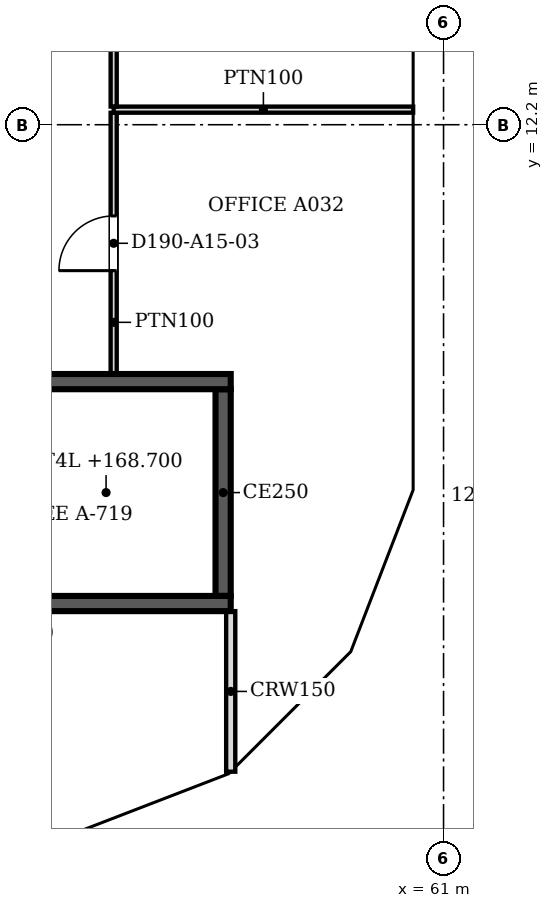
"""IFC4 building model, lengths in metres.
Left out: names, types, materials, properties, quantities, classifications, styles, units other than length and angle.
Written with IfcOpenShell. Run it as: python <this file> out.ifc"""

import sys

from ifc_helpers import new_model, si_unit, direction, frame, frame_2d, origin, place, context, subcontext, project, spatial, polyline, rectangle, outline, extrude, faceted_brep, source, transform, mapped, element, fill, save


model = new_model("IFC4")
c1 = context("Model", 3, precision=1e-05, world=origin(), true_north=direction((0.0, 1.0)))
c2 = subcontext(c1, "Body", "Model", "MODEL_VIEW")
j1 = project(units=[si_unit("LENGTHUNIT", "METRE"), si_unit("PLANEANGLEUNIT", "RADIAN")], contexts=[c1])
p1 = place(None, origin())
s1 = spatial("IfcSite", under=j1, at=p1, CompositionType="ELEMENT")
p2 = place(p1, origin())
s2 = spatial("IfcBuilding", under=s1, at=p2, CompositionType="ELEMENT")
p3 = place(p2, frame((0.0, 0.0, 166.8)))
s3 = spatial("IfcBuildingStorey", under=s2, at=p3, CompositionType="ELEMENT", Elevation=166.8)
m1 = source(origin(), c2, "Body", "Brep", [
    faceted_brep([(2.95, -0.25, 0.0), (3.003, -0.25, 0.068), (3.003, -0.25, 7.532), (2.95, -0.25, 7.6), (0.0, -0.25, 3.8), (0.047, 0.25, 3.86), (2.898, 0.25, 7.532), (2.898, 0.25, 0.068), (0.047, 0.25, 3.74), (2.95, 0.0, 0.0), (2.95, 0.0, 7.6), (0.0, 0.0, 3.8)], [[[0, 1, 2, 3, 4]], [[5, 6, 7, 8]], [[1, 0, 9]], [[10, 3, 2]], [[6, 5, 11, 4, 3, 10]], [[8, 7, 9, 0, 4, 11]], [[8, 11, 5]], [[1, 9, 7, 6, 10, 2]]]),
])
p4 = place(p3, frame((54.854, 0.25, -3.8), z_axis=(0.0, 0.0, 1.0), x_axis=(0.932970071518, 0.359953949349, 0.0)))
e1 = element("IfcWall", 1, at=p4, inside=s3, PredefinedType="SOLIDWALL", context=c2, shape_type="MappedRepresentation", body=[
    mapped(m1, transform((0.0, 0.0, 0.0), scale=1.0)),
])
m2 = source(origin(), c2, "Body", "SweptSolid", [
    extrude(outline(polyline([(2.75, 6.935), (0.316, 3.8), (2.75, 0.665), (2.75, 6.935)])), frame((0.0, 0.26, 0.0), z_axis=(0.0, -1.0, 0.0), x_axis=(1.0, 0.0, 0.0)), (0.0, 0.0, 1.0), 0.52),
])
p5 = place(p4, origin())
e2 = element("IfcOpeningElement", 2, at=p5, cuts=e1, PredefinedType="OPENING", context=c2, shape_type="MappedRepresentation", body=[
    mapped(m2, transform((0.0, 0.0, 0.0), scale=1.0)),
])
m3 = source(origin(), c2, "Body", "Brep", [
    faceted_brep([(0.053, -0.25, 0.0), (2.997, -0.25, 3.8), (0.053, -0.25, 7.6), (0.0, -0.25, 7.532), (0.0, -0.25, 0.068), (0.106, 0.25, 7.532), (2.944, 0.25, 3.868), (2.944, 0.25, 3.732), (0.106, 0.25, 0.068), (2.997, 0.0, 3.8), (0.053, 0.0, 0.0), (0.053, 0.0, 7.6)], [[[0, 1, 2, 3, 4]], [[5, 6, 7, 8]], [[8, 7, 9, 1, 0, 10]], [[6, 5, 11, 2, 1, 9]], [[3, 2, 11]], [[10, 0, 4]], [[8, 10, 4, 3, 11, 5]], [[9, 7, 6]]]),
])
p6 = place(p3, frame((57.569, 1.274, -3.8), z_axis=(0.0, 0.0, 1.0), x_axis=(0.707066050402, 0.707147509625, 0.0)))
e3 = element("IfcWall", 3, at=p6, inside=s3, PredefinedType="SOLIDWALL", context=c2, shape_type="MappedRepresentation", body=[
    mapped(m3, transform((0.0, 0.0, 0.0), scale=1.0)),
])
m4 = source(origin(), c2, "Body", "SweptSolid", [
    extrude(outline(polyline([(0.253, 0.666), (2.681, 3.8), (0.253, 6.934), (0.253, 0.666)])), frame((0.0, 0.26, 0.0), z_axis=(0.0, -1.0, 0.0), x_axis=(1.0, 0.0, 0.0)), (0.0, 0.0, 1.0), 0.52),
])
p7 = place(p6, origin())
e4 = element("IfcOpeningElement", 4, at=p7, cuts=e3, PredefinedType="OPENING", context=c2, shape_type="MappedRepresentation", body=[
    mapped(m4, transform((0.0, 0.0, 0.0), scale=1.0)),
])
m5 = source(origin(), c2, "Body", "Brep", [
    faceted_brep([(2.95, -0.25, 0.0), (2.997, -0.25, 0.059), (2.997, -0.25, 7.541), (2.95, -0.25, 7.6), (0.0, -0.25, 3.8), (0.053, 0.25, 3.868), (2.904, 0.25, 7.54), (2.904, 0.25, 0.06), (0.053, 0.25, 3.732), (2.95, 0.0, 0.0), (2.95, 0.0, 7.6), (0.0, 0.0, 3.8)], [[[0, 1, 2, 3, 4]], [[5, 6, 7, 8]], [[1, 0, 9]], [[10, 3, 2]], [[6, 5, 11, 4, 3, 10]], [[8, 7, 9, 0, 4, 11]], [[8, 11, 5]], [[1, 9, 7, 6, 10, 2]]]),
])
p8 = place(p3, frame((59.688, 3.394, -3.8), z_axis=(0.0, 0.0, 1.0), x_axis=(0.359972353723, 0.932962970624, 0.0)))
e5 = element("IfcWall", 5, at=p8, inside=s3, PredefinedType="SOLIDWALL", context=c2, shape_type="MappedRepresentation", body=[
    mapped(m5, transform((0.0, 0.0, 0.0), scale=1.0)),
])
p9 = place(p8, origin())
e6 = element("IfcOpeningElement", 6, at=p9, cuts=e5, PredefinedType="OPENING", context=c2, shape_type="MappedRepresentation", body=[
    mapped(m2, transform((0.0, 0.0, 0.0), scale=1.0)),
])
m6 = source(origin(), c2, "Body", "Brep", [
    faceted_brep([(0.047, -0.25, 0.0), (3.05, -0.25, 3.8), (0.047, -0.25, 7.6), (0.0, -0.25, 7.54), (0.0, -0.25, 0.06), (0.093, 0.25, 7.541), (3.05, 0.25, 3.8), (0.093, 0.25, 0.059), (0.047, 0.0, 0.0), (0.047, 0.0, 7.6)], [[[0, 1, 2, 3, 4]], [[5, 6, 7]], [[7, 6, 1, 0, 8]], [[6, 5, 9, 2, 1]], [[3, 2, 9]], [[8, 0, 4]], [[7, 8, 4, 3, 9, 5]]]),
])
p10 = place(p3, frame((60.75, 6.1, -3.8), z_axis=(0.0, 0.0, 1.0), x_axis=(0.0, 1.0, 0.0)))
e7 = element("IfcWall", 7, at=p10, inside=s3, PredefinedType="SOLIDWALL", context=c2, shape_type="MappedRepresentation", body=[
    mapped(m6, transform((0.0, 0.0, 0.0), scale=1.0)),
])
m7 = source(origin(), c2, "Body", "SweptSolid", [
    extrude(outline(polyline([(0.247, 0.656), (2.731, 3.8), (0.247, 6.944), (0.247, 0.656)])), frame((0.0, 0.26, 0.0), z_axis=(0.0, -1.0, 0.0), x_axis=(1.0, 0.0, 0.0)), (0.0, 0.0, 1.0), 0.52),
])
p11 = place(p10, origin())
e8 = element("IfcOpeningElement", 8, at=p11, cuts=e7, PredefinedType="OPENING", context=c2, shape_type="MappedRepresentation", body=[
    mapped(m7, transform((0.0, 0.0, 0.0), scale=1.0)),
])
m8 = source(origin(), c2, "Body", "SweptSolid", [
    extrude(outline(polyline([(3.05, 0.0), (6.1, 3.8), (3.05, 7.6), (0.0, 3.8), (3.05, 0.0)])), frame((0.0, 0.25, 0.0), z_axis=(0.0, -1.0, 0.0), x_axis=(1.0, 0.0, 0.0)), (0.0, 0.0, 1.0), 0.5),
])
p12 = place(p3, frame((60.75, 9.15, -3.8), z_axis=(0.0, 0.0, 1.0), x_axis=(0.0, 1.0, 0.0)))
e9 = element("IfcWall", 9, at=p12, inside=s3, PredefinedType="SOLIDWALL", context=c2, shape_type="MappedRepresentation", body=[
    mapped(m8, transform((0.0, 0.0, 0.0), scale=1.0)),
])
m9 = source(origin(), c2, "Body", "SweptSolid", [
    extrude(outline(polyline([(3.05, 0.399), (5.78, 3.8), (3.05, 7.201), (0.321, 3.8), (3.05, 0.399)])), frame((0.0, 0.26, 0.0), z_axis=(0.0, -1.0, 0.0), x_axis=(1.0, 0.0, 0.0)), (0.0, 0.0, 1.0), 0.52),
])
p13 = place(p12, origin())
e10 = element("IfcOpeningElement", 10, at=p13, cuts=e9, PredefinedType="OPENING", context=c2, shape_type="MappedRepresentation", body=[
    mapped(m9, transform((0.0, 0.0, 0.0), scale=1.0)),
])
p14 = place(p2, frame((0.0, 0.0, 170.6)))
s4 = spatial("IfcBuildingStorey", under=s2, at=p14, CompositionType="ELEMENT", Elevation=170.6)
m10 = source(origin(), c2, "Body", "Brep", [
    faceted_brep([(0.047, -0.25, 0.0), (2.997, -0.25, 3.8), (0.047, -0.25, 7.6), (0.0, -0.25, 7.541), (0.0, -0.25, 0.059), (0.093, 0.25, 7.54), (2.944, 0.25, 3.868), (2.944, 0.25, 3.732), (0.093, 0.25, 0.06), (2.997, 0.0, 3.8), (0.047, 0.0, 0.0), (0.047, 0.0, 7.6)], [[[0, 1, 2, 3, 4]], [[5, 6, 7, 8]], [[8, 7, 9, 1, 0, 10]], [[6, 5, 11, 2, 1, 9]], [[3, 2, 11]], [[10, 0, 4]], [[8, 10, 4, 3, 11, 5]], [[7, 6, 9]]]),
])
p15 = place(p14, frame((54.81, 0.233, -3.8), z_axis=(0.0, 0.0, 1.0), x_axis=(0.932990326376, 0.359901446078, 0.0)))
e11 = element("IfcWall", 11, at=p15, inside=s4, PredefinedType="SOLIDWALL", context=c2, shape_type="MappedRepresentation", body=[
    mapped(m10, transform((0.0, 0.0, 0.0), scale=1.0)),
])
m11 = source(origin(), c2, "Body", "SweptSolid", [
    extrude(outline(polyline([(0.247, 0.665), (2.681, 3.8), (0.247, 6.935), (0.247, 0.665)])), frame((0.0, 0.26, 0.0), z_axis=(0.0, -1.0, 0.0), x_axis=(1.0, 0.0, 0.0)), (0.0, 0.0, 1.0), 0.52),
])
p16 = place(p15, origin())
e12 = element("IfcOpeningElement", 12, at=p16, cuts=e11, PredefinedType="OPENING", context=c2, shape_type="MappedRepresentation", body=[
    mapped(m11, transform((0.0, 0.0, 0.0), scale=1.0)),
])
m12 = source(origin(), c2, "Body", "Brep", [
    faceted_brep([(2.944, -0.25, 0.0), (2.997, -0.25, 0.068), (2.997, -0.25, 7.532), (2.944, -0.25, 7.6), (0.0, -0.25, 3.8), (0.053, 0.25, 3.868), (2.891, 0.25, 7.532), (2.891, 0.25, 0.068), (0.053, 0.25, 3.732), (2.944, 0.0, 0.0), (2.944, 0.0, 7.6), (0.0, 0.0, 3.8)], [[[0, 1, 2, 3, 4]], [[5, 6, 7, 8]], [[1, 0, 9]], [[10, 3, 2]], [[6, 5, 11, 4, 3, 10]], [[8, 7, 9, 0, 4, 11]], [[8, 11, 5]], [[1, 9, 7, 6, 10, 2]]]),
])
p17 = place(p14, frame((57.606, 1.312, -3.8), z_axis=(0.0, 0.0, 1.0), x_axis=(0.707147509625, 0.707066050402, 0.0)))
e13 = element("IfcWall", 13, at=p17, inside=s4, PredefinedType="SOLIDWALL", context=c2, shape_type="MappedRepresentation", body=[
    mapped(m12, transform((0.0, 0.0, 0.0), scale=1.0)),
])
m13 = source(origin(), c2, "Body", "SweptSolid", [
    extrude(outline(polyline([(2.744, 6.934), (0.316, 3.8), (2.744, 0.666), (2.744, 6.934)])), frame((0.0, 0.26, 0.0), z_axis=(0.0, -1.0, 0.0), x_axis=(1.0, 0.0, 0.0)), (0.0, 0.0, 1.0), 0.52),
])
p18 = place(p17, origin())
e14 = element("IfcOpeningElement", 14, at=p18, cuts=e13, PredefinedType="OPENING", context=c2, shape_type="MappedRepresentation", body=[
    mapped(m13, transform((0.0, 0.0, 0.0), scale=1.0)),
])
m14 = source(origin(), c2, "Body", "Brep", [
    faceted_brep([(0.053, -0.25, 0.0), (3.003, -0.25, 3.8), (0.053, -0.25, 7.6), (0.0, -0.25, 7.531), (0.0, -0.25, 0.068), (0.106, 0.25, 7.532), (2.957, 0.25, 3.86), (2.957, 0.25, 3.74), (0.106, 0.25, 0.068), (3.003, 0.0, 3.8), (0.053, 0.0, 0.0), (0.053, 0.0, 7.6)], [[[0, 1, 2, 3, 4]], [[5, 6, 7, 8]], [[8, 7, 9, 1, 0, 10]], [[6, 5, 11, 2, 1, 9]], [[3, 2, 11]], [[10, 0, 4]], [[8, 10, 4, 3, 11, 5]], [[7, 6, 9]]]),
])
p19 = place(p14, frame((59.669, 3.344, -3.8), z_axis=(0.0, 0.0, 1.0), x_axis=(0.35992665181, 0.932980602862, 0.0)))
e15 = element("IfcWall", 15, at=p19, inside=s4, PredefinedType="SOLIDWALL", context=c2, shape_type="MappedRepresentation", body=[
    mapped(m14, transform((0.0, 0.0, 0.0), scale=1.0)),
])
m15 = source(origin(), c2, "Body", "SweptSolid", [
    extrude(outline(polyline([(0.253, 0.665), (2.687, 3.8), (0.253, 6.935), (0.253, 0.665)])), frame((0.0, 0.26, 0.0), z_axis=(0.0, -1.0, 0.0), x_axis=(1.0, 0.0, 0.0)), (0.0, 0.0, 1.0), 0.52),
])
p20 = place(p19, origin())
e16 = element("IfcOpeningElement", 16, at=p20, cuts=e15, PredefinedType="OPENING", context=c2, shape_type="MappedRepresentation", body=[
    mapped(m15, transform((0.0, 0.0, 0.0), scale=1.0)),
])
m16 = source(origin(), c2, "Body", "Brep", [
    faceted_brep([(3.003, -0.25, 0.0), (6.053, -0.25, 3.8), (3.003, -0.25, 7.6), (0.0, -0.25, 3.8), (0.047, 0.25, 3.859), (3.003, 0.25, 7.6), (6.053, 0.25, 3.8), (3.003, 0.25, 0.0), (0.047, 0.25, 3.741), (0.0, 0.0, 3.8)], [[[0, 1, 2, 3]], [[4, 5, 6, 7, 8]], [[7, 6, 1, 0]], [[6, 5, 2, 1]], [[5, 4, 9, 3, 2]], [[8, 7, 0, 3, 9]], [[8, 9, 4]]]),
])
p21 = place(p14, frame((60.75, 6.146, -3.8), z_axis=(0.0, 0.0, 1.0), x_axis=(0.0, 1.0, 0.0)))
e17 = element("IfcWall", 17, at=p21, inside=s4, PredefinedType="SOLIDWALL", context=c2, shape_type="MappedRepresentation", body=[
    mapped(m16, transform((0.0, 0.0, 0.0), scale=1.0)),
])
m17 = source(origin(), c2, "Body", "SweptSolid", [
    extrude(outline(polyline([(3.005, 0.401), (5.733, 3.8), (3.005, 7.199), (0.319, 3.8), (3.005, 0.401)])), frame((0.0, 0.26, 0.0), z_axis=(0.0, -1.0, 0.0), x_axis=(1.0, 0.0, 0.0)), (0.0, 0.0, 1.0), 0.52),
])
p22 = place(p21, origin())
e18 = element("IfcOpeningElement", 18, at=p22, cuts=e17, PredefinedType="OPENING", context=c2, shape_type="MappedRepresentation", body=[
    mapped(m17, transform((0.0, 0.0, 0.0), scale=1.0)),
])
m18 = source(origin(), c2, "Body", "SweptSolid", [
    extrude(outline(polyline([(3.05, 0.0), (6.1, 3.8), (3.05, 7.6), (0.0, 3.8), (3.05, 0.0)])), frame((0.0, 0.25, 0.0), z_axis=(0.0, -1.0, 0.0), x_axis=(1.0, 0.0, 0.0)), (0.0, 0.0, 1.0), 0.5),
])
p23 = place(p14, frame((60.75, 12.2, -3.8), z_axis=(0.0, 0.0, 1.0), x_axis=(0.0, 1.0, 0.0)))
e19 = element("IfcWall", 19, at=p23, inside=s4, PredefinedType="SOLIDWALL", context=c2, shape_type="MappedRepresentation", body=[
    mapped(m18, transform((0.0, 0.0, 0.0), scale=1.0)),
])
m19 = source(origin(), c2, "Body", "SweptSolid", [
    extrude(outline(polyline([(3.05, 0.399), (5.78, 3.8), (3.05, 7.2), (0.321, 3.8), (3.05, 0.399)])), frame((0.0, 0.26, 0.0), z_axis=(0.0, -1.0, 0.0), x_axis=(1.0, 0.0, 0.0)), (0.0, 0.0, 1.0), 0.52),
])
p24 = place(p23, origin())
e20 = element("IfcOpeningElement", 20, at=p24, cuts=e19, PredefinedType="OPENING", context=c2, shape_type="MappedRepresentation", body=[
    mapped(m19, transform((0.0, 0.0, 0.0), scale=1.0)),
])
p25 = place(p3, frame((57.5, 4.325, 0.0), z_axis=(0.0, 0.0, 1.0), x_axis=(-1.0, 0.0, 0.0)))
e21 = element("IfcWall", 21, at=p25, inside=s3, PredefinedType="SOLIDWALL", context=c2, shape_type="SweptSolid", body=[
    extrude(rectangle(XDim=8.5, YDim=0.25, at=frame_2d((4.25, 0.0))), origin(), (0.0, 0.0, 1.0), 3.8),
])
m20 = source(origin(), c2, "Body", "SweptSolid", [
    extrude(rectangle(XDim=1.2, YDim=2.1, at=frame_2d((0.6, 1.05))), frame((0.0, 0.135, 0.0), z_axis=(0.0, -1.0, 0.0), x_axis=(1.0, 0.0, 0.0)), (0.0, 0.0, 1.0), 0.27),
])
p26 = place(p25, frame((6.9, 0.0, 0.0)))
e22 = element("IfcOpeningElement", 22, at=p26, cuts=e21, PredefinedType="OPENING", context=c2, shape_type="MappedRepresentation", body=[
    mapped(m20, transform((0.0, 0.0, 0.0), scale=1.0)),
])
p27 = place(p3, frame((49.0, 7.975, 0.0), z_axis=(0.0, 0.0, 1.0), x_axis=(1.0, 0.0, 0.0)))
e23 = element("IfcWall", 23, at=p27, inside=s3, PredefinedType="SOLIDWALL", context=c2, shape_type="SweptSolid", body=[
    extrude(rectangle(XDim=8.5, YDim=0.25, at=frame_2d((4.25, 0.0))), origin(), (0.0, 0.0, 1.0), 3.8),
])
p28 = place(p3, frame((57.375, 7.85, 0.0), z_axis=(0.0, 0.0, 1.0), x_axis=(0.0, -1.0, 0.0)))
e24 = element("IfcWall", 24, at=p28, inside=s3, PredefinedType="SOLIDWALL", context=c2, shape_type="SweptSolid", body=[
    extrude(rectangle(XDim=3.4, YDim=0.25, at=frame_2d((1.7, 0.0))), origin(), (0.0, 0.0, 1.0), 3.8),
])
p29 = place(p3, frame((57.5, 1.559, 0.0), z_axis=(0.0, 0.0, 1.0), x_axis=(0.0, 1.0, 0.0)))
e25 = element("IfcWall", 25, at=p29, inside=s3, PredefinedType="PARTITIONING", context=c2, shape_type="SweptSolid", body=[
    extrude(rectangle(XDim=2.641, YDim=0.15, at=frame_2d((1.32, 0.0))), origin(), (0.0, 0.0, 1.0), 3.067),
])
p30 = place(p3, frame((55.575, 12.397, 0.0), z_axis=(0.0, 0.0, 1.0), x_axis=(0.0, -1.0, 0.0)))
e26 = element("IfcWall", 26, at=p30, inside=s3, PredefinedType="PARTITIONING", context=c2, shape_type="SweptSolid", body=[
    extrude(rectangle(XDim=4.297, YDim=0.1, at=frame_2d((2.148, 0.0))), origin(), (0.0, 0.0, 1.0), 3.067),
])
m21 = source(origin(), c2, "Body", "SweptSolid", [
    extrude(rectangle(XDim=0.9, YDim=2.1, at=frame_2d((0.45, 1.05))), frame((0.0, 0.06, 0.0), z_axis=(0.0, -1.0, 0.0), x_axis=(1.0, 0.0, 0.0)), (0.0, 0.0, 1.0), 0.12),
])
p31 = place(p30, frame((1.697, 0.0, 0.0)))
e27 = element("IfcOpeningElement", 27, at=p31, cuts=e26, PredefinedType="OPENING", context=c2, shape_type="MappedRepresentation", body=[
    mapped(m21, transform((0.0, 0.0, 0.0), scale=1.0)),
])
p32 = place(p3, frame((55.575, 12.448, 0.0), z_axis=(0.0, 0.0, 1.0), x_axis=(1.0, 0.0, 0.0)))
e28 = element("IfcWall", 28, at=p32, inside=s3, PredefinedType="PARTITIONING", context=c2, shape_type="SweptSolid", body=[
    extrude(rectangle(XDim=4.925, YDim=0.1, at=frame_2d((2.462, 0.0))), origin(), (0.0, 0.0, 1.0), 3.067),
])
p33 = place(p3, frame((55.575, 17.024, 0.0), z_axis=(0.0, 0.0, 1.0), x_axis=(0.0, -1.0, 0.0)))
e29 = element("IfcWall", 29, at=p33, inside=s3, PredefinedType="PARTITIONING", context=c2, shape_type="SweptSolid", body=[
    extrude(rectangle(XDim=4.525, YDim=0.1, at=frame_2d((2.263, 0.0))), origin(), (0.0, 0.0, 1.0), 3.067),
])
p34 = place(p33, frame((1.825, 0.0, 0.0)))
e30 = element("IfcOpeningElement", 30, at=p34, cuts=e29, PredefinedType="OPENING", context=c2, shape_type="MappedRepresentation", body=[
    mapped(m21, transform((0.0, 0.0, 0.0), scale=1.0)),
])
m22 = source(origin(), c2, "Body", "SweptSolid", [
    extrude(rectangle(XDim=0.9, YDim=2.1, at=frame_2d((0.45, 1.05))), frame((0.0, 0.025, 0.0), z_axis=(0.0, -1.0, 0.0), x_axis=(1.0, 0.0, 0.0)), (0.0, 0.0, 1.0), 0.05),
])
p35 = place(p31, origin())
e31 = element("IfcDoor", 31, at=p35, inside=s3, OperationType="SINGLE_SWING_RIGHT", PredefinedType="DOOR", context=c2, shape_type="MappedRepresentation", body=[
    mapped(m22, transform((0.0, 0.0, 0.0), scale=1.0)),
])
fill(e27, e31)
save(model, sys.argv[1])
